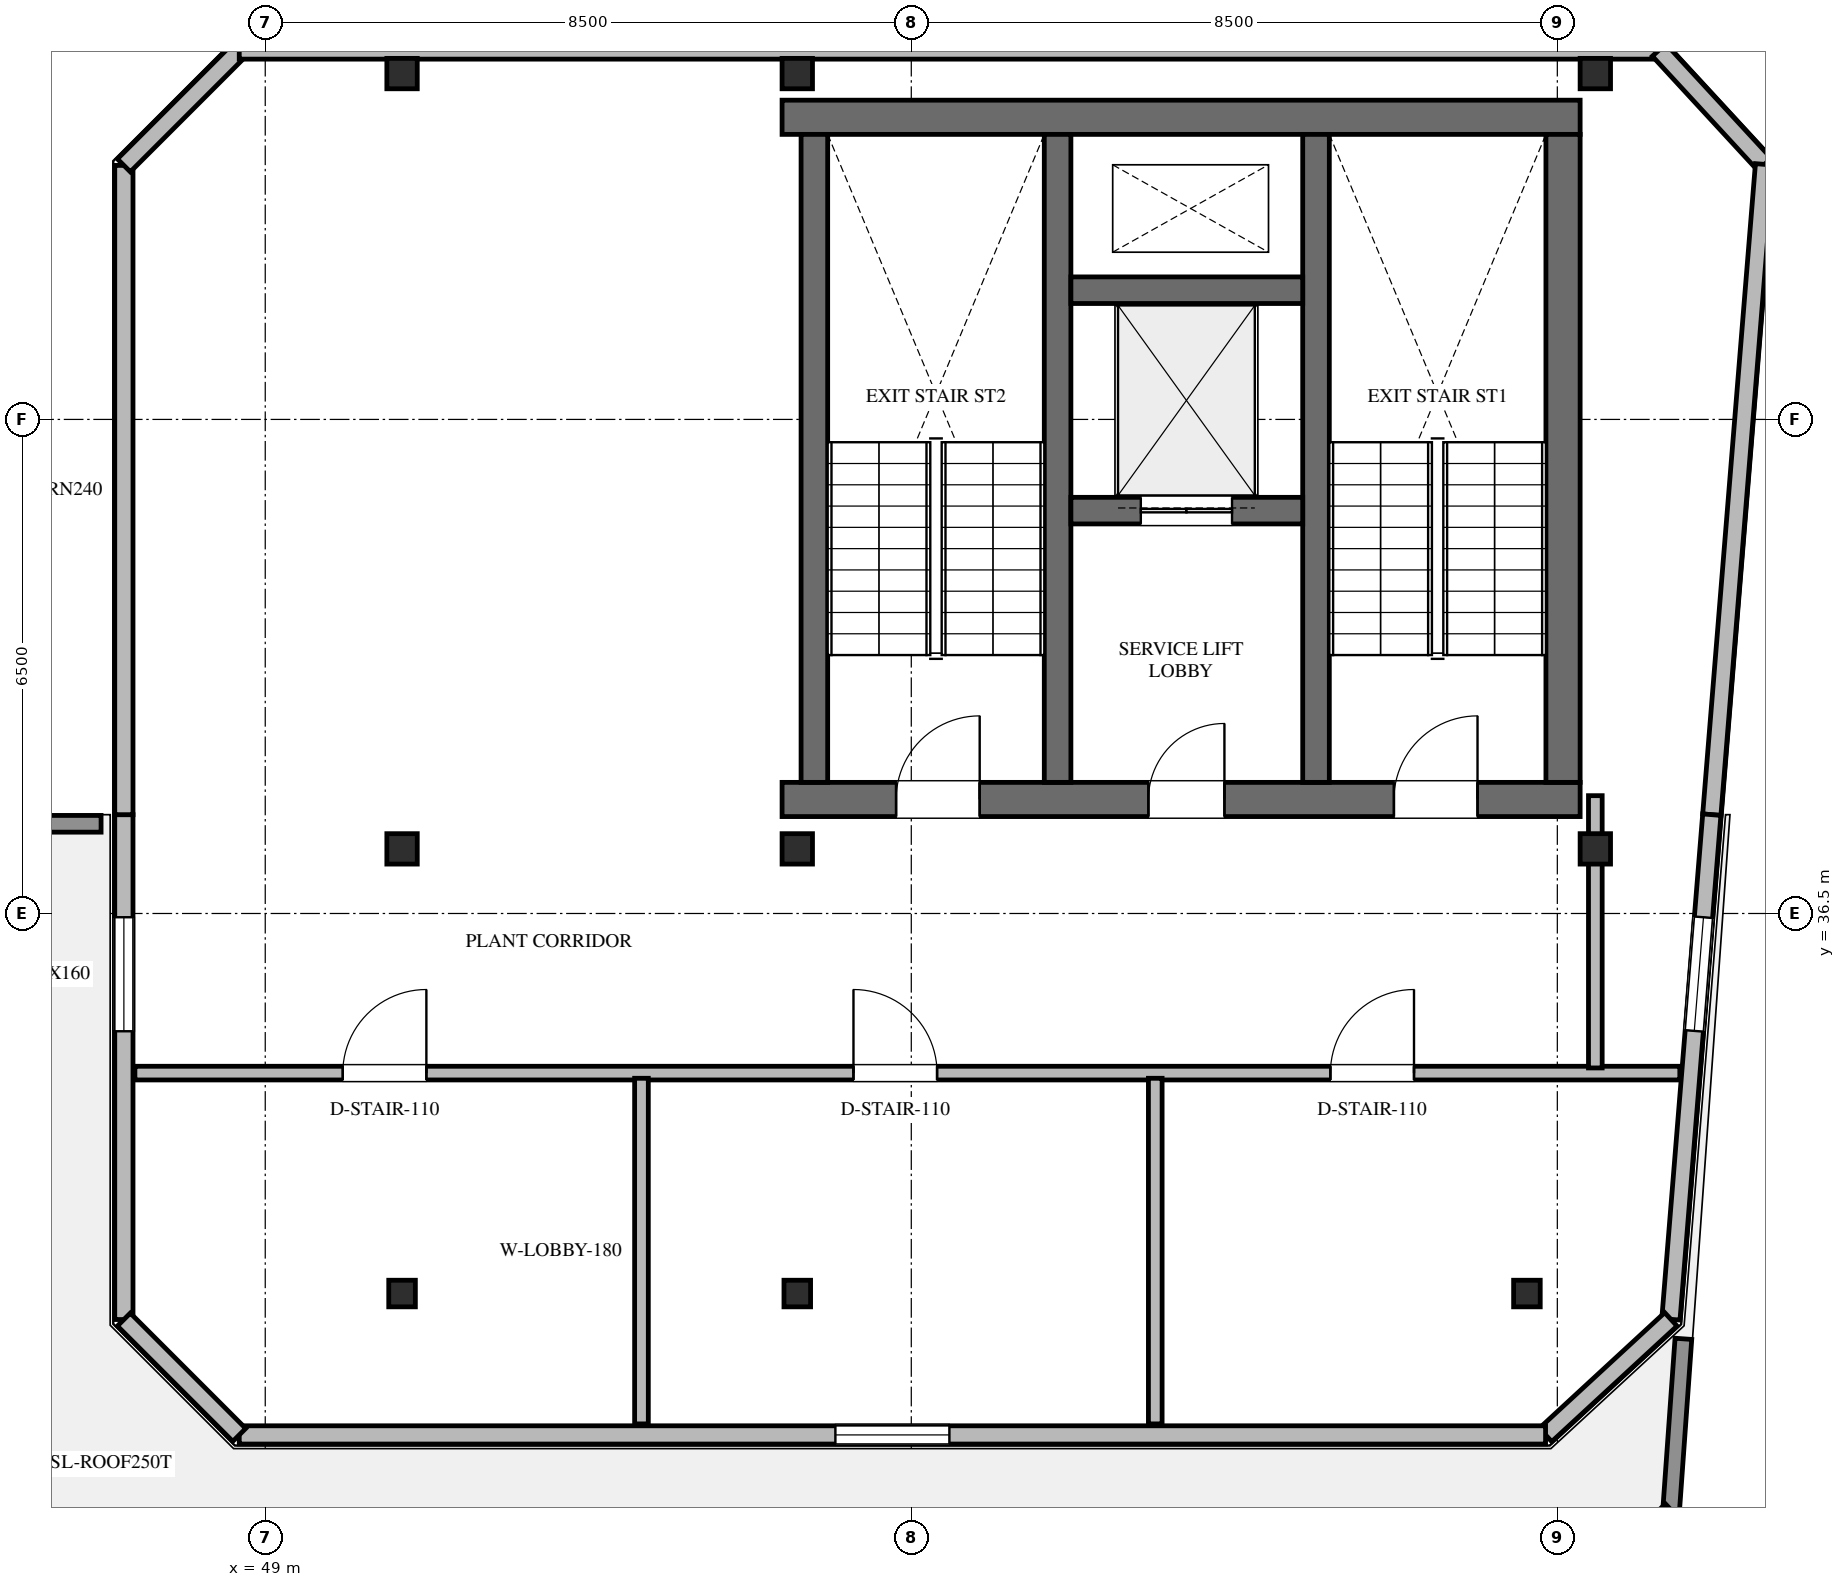
"""IFC4 building model, lengths in metres.
Left out: names, types, materials, properties, quantities, classifications, styles, units other than length and angle.
Written with IfcOpenShell. Run it as: python <this file> out.ifc"""

import sys

from ifc_helpers import new_model, si_unit, direction, frame, frame_2d, origin, origin_2d, place, context, subcontext, project, spatial, rectangle, hollow_rectangle, extrude, element, fill, save


model = new_model("IFC4")
c1 = context("Model", 3, precision=1e-05, world=origin(), true_north=direction((0.0, 1.0)))
c2 = subcontext(c1, "Body", "Model", "MODEL_VIEW")
j1 = project(units=[si_unit("LENGTHUNIT", "METRE"), si_unit("PLANEANGLEUNIT", "RADIAN")], contexts=[c1])
p1 = place(None, origin())
s1 = spatial("IfcSite", under=j1, at=p1, CompositionType="ELEMENT")
p2 = place(p1, origin())
s2 = spatial("IfcBuilding", under=s1, at=p2, CompositionType="ELEMENT")
p3 = place(p2, frame((0.0, 0.0, 322.8)))
s3 = spatial("IfcBuildingStorey", under=s2, at=p3, CompositionType="ELEMENT", Elevation=322.8)
p4 = place(p3, frame((55.8, 46.975, 0.0), z_axis=(0.0, 0.0, 1.0), x_axis=(1.0, 0.0, 0.0)))
e1 = element("IfcWall", 1, at=p4, inside=s3, PredefinedType="SHEAR", context=c2, shape_type="SweptSolid", body=[
    extrude(rectangle(XDim=10.5, YDim=0.45, at=frame_2d((5.25, 0.0))), origin(), (0.0, 0.0, 1.0), 3.6),
])
p5 = place(p3, frame((55.8, 38.0, 0.0), z_axis=(0.0, 0.0, 1.0), x_axis=(1.0, 0.0, 0.0)))
e2 = element("IfcWall", 2, at=p5, inside=s3, PredefinedType="SHEAR", context=c2, shape_type="SweptSolid", body=[
    extrude(rectangle(XDim=10.5, YDim=0.45, at=frame_2d((5.25, 0.0))), origin(), (0.0, 0.0, 1.0), 3.6),
])
p6 = place(p5, frame((1.5, 0.0, 0.0)))
e3 = element("IfcOpeningElement", 3, at=p6, cuts=e2, PredefinedType="OPENING", context=c2, shape_type="SweptSolid", body=[
    extrude(rectangle(XDim=1.1, YDim=2.2, at=frame_2d((0.55, 1.1))), frame((0.0, 0.235, 0.0), z_axis=(0.0, -1.0, 0.0), x_axis=(1.0, 0.0, 0.0)), (0.0, 0.0, 1.0), 0.47),
])
p7 = place(p5, frame((4.82, 0.0, 0.0)))
e4 = element("IfcOpeningElement", 4, at=p7, cuts=e2, PredefinedType="OPENING", context=c2, shape_type="SweptSolid", body=[
    extrude(rectangle(XDim=1.0, YDim=2.15, at=frame_2d((0.5, 1.075))), frame((0.0, 0.235, 0.0), z_axis=(0.0, -1.0, 0.0), x_axis=(1.0, 0.0, 0.0)), (0.0, 0.0, 1.0), 0.47),
])
p8 = place(p5, frame((8.05, 0.0, 0.0)))
e5 = element("IfcOpeningElement", 5, at=p8, cuts=e2, PredefinedType="OPENING", context=c2, shape_type="SweptSolid", body=[
    extrude(rectangle(XDim=1.1, YDim=2.2, at=frame_2d((0.55, 1.1))), frame((0.0, 0.235, 0.0), z_axis=(0.0, -1.0, 0.0), x_axis=(1.0, 0.0, 0.0)), (0.0, 0.0, 1.0), 0.47),
])
p9 = place(p3, frame((66.075, 38.225, 0.0), z_axis=(0.0, 0.0, 1.0), x_axis=(0.0, 1.0, 0.0)))
e6 = element("IfcWall", 6, at=p9, inside=s3, PredefinedType="SHEAR", context=c2, shape_type="SweptSolid", body=[
    extrude(rectangle(XDim=8.525, YDim=0.45, at=frame_2d((4.262, 0.0))), origin(), (0.0, 0.0, 1.0), 3.6),
])
for number, where, z_axis, x_axis in (
    (7, (62.825, 38.225, 0.0), (0.0, 0.0, 1.0), (0.0, 1.0, 0.0)),
    (8, (59.425, 38.225, 0.0), (0.0, 0.0, 1.0), (0.0, 1.0, 0.0)),
    (9, (56.225, 38.225, 0.0), (0.0, 0.0, 1.0), (0.0, 1.0, 0.0)),
):
    element("IfcWall", number, at=place(p3, frame(where, z_axis=z_axis, x_axis=x_axis)), inside=s3, PredefinedType="SHEAR", context=c2, shape_type="SweptSolid", body=[
        extrude(rectangle(XDim=8.525, YDim=0.35, at=frame_2d((4.262, 0.0))), origin(), (0.0, 0.0, 1.0), 3.6),
    ])
p10 = place(p3, frame((59.6, 41.8, 0.0), z_axis=(0.0, 0.0, 1.0), x_axis=(1.0, 0.0, 0.0)))
e10 = element("IfcWall", 10, at=p10, inside=s3, PredefinedType="SHEAR", context=c2, shape_type="SweptSolid", body=[
    extrude(rectangle(XDim=3.05, YDim=0.35, at=frame_2d((1.525, 0.0))), origin(), (0.0, 0.0, 1.0), 3.6),
])
p11 = place(p10, frame((0.92, 0.0, 0.0)))
e11 = element("IfcOpeningElement", 11, at=p11, cuts=e10, PredefinedType="OPENING", context=c2, shape_type="SweptSolid", body=[
    extrude(rectangle(XDim=1.2, YDim=2.2, at=frame_2d((0.6, 1.1))), frame((0.0, 0.185, 0.0), z_axis=(0.0, -1.0, 0.0), x_axis=(1.0, 0.0, 0.0)), (0.0, 0.0, 1.0), 0.37),
])
p12 = place(p3, frame((59.6, 44.7, 0.0), z_axis=(0.0, 0.0, 1.0), x_axis=(1.0, 0.0, 0.0)))
e12 = element("IfcWall", 12, at=p12, inside=s3, PredefinedType="SHEAR", context=c2, shape_type="SweptSolid", body=[
    extrude(rectangle(XDim=3.05, YDim=0.35, at=frame_2d((1.525, 0.0))), origin(), (0.0, 0.0, 1.0), 3.6),
])
for number, where, z_axis, x_axis in (
    (13, (56.0, 31.5, 0.0), (0.0, 0.0, 1.0), (1.0, 0.0, 0.0)),
    (14, (65.6, 31.5, 0.0), (0.0, 0.0, 1.0), (1.0, 0.0, 0.0)),
    (15, (50.8, 31.5, 0.0), (0.0, 0.0, 1.0), (1.0, 0.0, 0.0)),
):
    element("IfcColumn", number, at=place(p3, frame(where, z_axis=z_axis, x_axis=x_axis)), inside=s3, PredefinedType="COLUMN", context=c2, shape_type="SweptSolid", body=[
        extrude(hollow_rectangle(XDim=0.35, YDim=0.35, WallThickness=0.016, at=origin_2d()), origin(), (0.0, 0.0, 1.0), 3.6),
    ])
for number, where, z_axis, x_axis in (
    (16, (66.5, 47.55, 0.0), (0.0, 0.0, 1.0), (1.0, 0.0, 0.0)),
    (17, (56.0, 47.55, 0.0), (0.0, 0.0, 1.0), (1.0, 0.0, 0.0)),
    (18, (66.5, 37.35, 0.0), (0.0, 0.0, 1.0), (1.0, 0.0, 0.0)),
    (19, (56.0, 37.35, 0.0), (0.0, 0.0, 1.0), (1.0, 0.0, 0.0)),
    (20, (50.8, 47.55, 0.0), (0.0, 0.0, 1.0), (1.0, 0.0, 0.0)),
    (21, (50.8, 37.35, 0.0), (0.0, 0.0, 1.0), (1.0, 0.0, 0.0)),
):
    element("IfcColumn", number, at=place(p3, frame(where, z_axis=z_axis, x_axis=x_axis)), inside=s3, PredefinedType="COLUMN", context=c2, shape_type="SweptSolid", body=[
        extrude(hollow_rectangle(XDim=0.4, YDim=0.4, WallThickness=0.016, at=origin_2d()), origin(), (0.0, 0.0, 1.0), 3.6),
    ])
p13 = place(p3, frame((46.15, 27.12, 0.0), z_axis=(0.0, 0.0, 1.0), x_axis=(-0.707106781187, 0.707106781187, 0.0)))
e22 = element("IfcWall", 22, at=p13, inside=s3, PredefinedType="PARAPET", context=c2, shape_type="SweptSolid", body=[
    extrude(rectangle(XDim=2.163, YDim=0.22, at=frame_2d((1.082, 0.0))), origin(), (0.0, 0.0, 1.0), 1.2),
])
p14 = place(p3, frame((44.62, 37.68, 0.0), z_axis=(0.0, 0.0, 1.0), x_axis=(1.0, 0.0, 0.0)))
e23 = element("IfcWall", 23, at=p14, inside=s3, PredefinedType="PARAPET", context=c2, shape_type="SweptSolid", body=[
    extrude(rectangle(XDim=2.22, YDim=0.22, at=frame_2d((1.11, 0.0))), origin(), (0.0, 0.0, 1.0), 1.2),
])
p15 = place(p3, frame((67.659, 30.904, 0.0), z_axis=(0.0, 0.0, 1.0), x_axis=(-0.071247049988, -0.997458699831, 0.0)))
e24 = element("IfcWall", 24, at=p15, inside=s3, PredefinedType="PARAPET", context=c2, shape_type="SweptSolid", body=[
    extrude(rectangle(XDim=2.258, YDim=0.22, at=frame_2d((1.129, 0.0))), origin(), (0.0, 0.0, 1.0), 1.2),
])
p16 = place(p3, frame((67.498, 28.652, 0.0), z_axis=(0.0, 0.0, 1.0), x_axis=(-0.731910786765, -0.68140046978, 0.0)))
e25 = element("IfcWall", 25, at=p16, inside=s3, PredefinedType="PARAPET", context=c2, shape_type="SweptSolid", body=[
    extrude(rectangle(XDim=2.248, YDim=0.22, at=frame_2d((1.124, 0.0))), origin(), (0.0, 0.0, 1.0), 1.2),
])
p17 = place(p3, frame((47.14, 31.158, 0.0), z_axis=(0.0, 0.0, 1.0), x_axis=(0.0, 1.0, 0.0)))
e26 = element("IfcWall", 26, at=p17, inside=s3, PredefinedType="STANDARD", context=c2, shape_type="SweptSolid", body=[
    extrude(rectangle(XDim=6.642, YDim=0.24, at=frame_2d((3.321, 0.0))), origin(), (0.0, 0.0, 1.0), 3.32),
])
p18 = place(p17, frame((3.792, 0.0, 0.9)))
e27 = element("IfcOpeningElement", 27, at=p18, cuts=e26, PredefinedType="OPENING", context=c2, shape_type="SweptSolid", body=[
    extrude(rectangle(XDim=1.5, YDim=1.6, at=frame_2d((0.75, 0.8))), frame((0.0, 0.13, 0.0), z_axis=(0.0, -1.0, 0.0), x_axis=(1.0, 0.0, 0.0)), (0.0, 0.0, 1.0), 0.26),
])
p19 = place(p3, frame((47.14, 37.8, 0.0), z_axis=(0.0, 0.0, 1.0), x_axis=(0.0, 1.0, 0.0)))
e28 = element("IfcWall", 28, at=p19, inside=s3, PredefinedType="STANDARD", context=c2, shape_type="SweptSolid", body=[
    extrude(rectangle(XDim=8.542, YDim=0.24, at=frame_2d((4.271, 0.0))), origin(), (0.0, 0.0, 1.0), 3.32),
])
p20 = place(p3, frame((47.14, 46.342, 0.0), z_axis=(0.0, 0.0, 1.0), x_axis=(0.707106781187, 0.707106781187, 0.0)))
e29 = element("IfcWall", 29, at=p20, inside=s3, PredefinedType="STANDARD", context=c2, shape_type="SweptSolid", body=[
    extrude(rectangle(XDim=2.147, YDim=0.24, at=frame_2d((1.073, 0.0))), origin(), (0.0, 0.0, 1.0), 3.32),
])
p21 = place(p3, frame((48.658, 47.86, 0.0), z_axis=(0.0, 0.0, 1.0), x_axis=(1.0, 0.0, 0.0)))
e30 = element("IfcWall", 30, at=p21, inside=s3, PredefinedType="STANDARD", context=c2, shape_type="SweptSolid", body=[
    extrude(rectangle(XDim=18.681, YDim=0.24, at=frame_2d((9.34, 0.0))), origin(), (0.0, 0.0, 1.0), 2.709),
])
p22 = place(p3, frame((67.339, 47.86, 0.0), z_axis=(0.0, 0.0, 1.0), x_axis=(0.677962987297, -0.735096039886, 0.0)))
e31 = element("IfcWall", 31, at=p22, inside=s3, PredefinedType="STANDARD", context=c2, shape_type="SweptSolid", body=[
    extrude(rectangle(XDim=2.047, YDim=0.24, at=frame_2d((1.023, 0.0))), origin(), (0.0, 0.0, 1.0), 3.32),
])
p23 = place(p3, frame((68.726, 46.355, 0.0), z_axis=(0.0, 0.0, 1.0), x_axis=(-0.080834961466, -0.996727499874, 0.0)))
e32 = element("IfcWall", 32, at=p23, inside=s3, PredefinedType="STANDARD", context=c2, shape_type="SweptSolid", body=[
    extrude(rectangle(XDim=8.583, YDim=0.24, at=frame_2d((4.292, 0.0))), origin(), (0.0, 0.0, 1.0), 3.32),
])
p24 = place(p3, frame((68.032, 37.8, 0.0), z_axis=(0.0, 0.0, 1.0), x_axis=(-0.080815868766, -0.996729048115, 0.0)))
e33 = element("IfcWall", 33, at=p24, inside=s3, PredefinedType="STANDARD", context=c2, shape_type="SweptSolid", body=[
    extrude(rectangle(XDim=6.661, YDim=0.24, at=frame_2d((3.331, 0.0))), origin(), (0.0, 0.0, 1.0), 3.32),
])
p25 = place(p24, frame((1.354, 0.0, 0.9)))
e34 = element("IfcOpeningElement", 34, at=p25, cuts=e33, PredefinedType="OPENING", context=c2, shape_type="SweptSolid", body=[
    extrude(rectangle(XDim=1.5, YDim=1.6, at=frame_2d((0.75, 0.8))), frame((0.0, 0.13, 0.0), z_axis=(0.0, -1.0, 0.0), x_axis=(1.0, 0.0, 0.0)), (0.0, 0.0, 1.0), 0.26),
])
p26 = place(p3, frame((67.494, 31.161, 0.0), z_axis=(0.0, 0.0, 1.0), x_axis=(-0.735099639576, -0.677959084234, 0.0)))
e35 = element("IfcWall", 35, at=p26, inside=s3, PredefinedType="STANDARD", context=c2, shape_type="SweptSolid", body=[
    extrude(rectangle(XDim=2.243, YDim=0.24, at=frame_2d((1.122, 0.0))), origin(), (0.0, 0.0, 1.0), 3.32),
])
p27 = place(p3, frame((65.845, 29.64, 0.0), z_axis=(0.0, 0.0, 1.0), x_axis=(-1.0, 0.0, 0.0)))
e36 = element("IfcWall", 36, at=p27, inside=s3, PredefinedType="STANDARD", context=c2, shape_type="SweptSolid", body=[
    extrude(rectangle(XDim=17.187, YDim=0.24, at=frame_2d((8.594, 0.0))), origin(), (0.0, 0.0, 1.0), 3.32),
])
p28 = place(p27, frame((7.844, 0.0, 0.9)))
e37 = element("IfcOpeningElement", 37, at=p28, cuts=e36, PredefinedType="OPENING", context=c2, shape_type="SweptSolid", body=[
    extrude(rectangle(XDim=1.5, YDim=1.6, at=frame_2d((0.75, 0.8))), frame((0.0, 0.13, 0.0), z_axis=(0.0, -1.0, 0.0), x_axis=(1.0, 0.0, 0.0)), (0.0, 0.0, 1.0), 0.26),
])
p29 = place(p3, frame((48.658, 29.64, 0.0), z_axis=(0.0, 0.0, 1.0), x_axis=(-0.707106781187, 0.707106781187, 0.0)))
e38 = element("IfcWall", 38, at=p29, inside=s3, PredefinedType="STANDARD", context=c2, shape_type="SweptSolid", body=[
    extrude(rectangle(XDim=2.147, YDim=0.24, at=frame_2d((1.073, 0.0))), origin(), (0.0, 0.0, 1.0), 3.32),
])
p30 = place(p3, frame((47.285, 34.4, 0.0), z_axis=(0.0, 0.0, 1.0), x_axis=(1.0, 0.0, 0.0)))
e39 = element("IfcWall", 39, at=p30, inside=s3, PredefinedType="STANDARD", context=c2, shape_type="SweptSolid", body=[
    extrude(rectangle(XDim=20.326, YDim=0.18, at=frame_2d((10.163, 0.0))), origin(), (0.0, 0.0, 1.0), 2.709),
])
p31 = place(p30, frame((2.735, 0.0, 0.0)))
e40 = element("IfcOpeningElement", 40, at=p31, cuts=e39, PredefinedType="OPENING", context=c2, shape_type="SweptSolid", body=[
    extrude(rectangle(XDim=1.1, YDim=2.2, at=frame_2d((0.55, 1.1))), frame((0.0, 0.1, 0.0), z_axis=(0.0, -1.0, 0.0), x_axis=(1.0, 0.0, 0.0)), (0.0, 0.0, 1.0), 0.2),
])
p32 = place(p30, frame((9.454, 0.0, 0.0)))
e41 = element("IfcOpeningElement", 41, at=p32, cuts=e39, PredefinedType="OPENING", context=c2, shape_type="SweptSolid", body=[
    extrude(rectangle(XDim=1.1, YDim=2.2, at=frame_2d((0.55, 1.1))), frame((0.0, 0.1, 0.0), z_axis=(0.0, -1.0, 0.0), x_axis=(1.0, 0.0, 0.0)), (0.0, 0.0, 1.0), 0.2),
])
p33 = place(p30, frame((15.729, 0.0, 0.0)))
e42 = element("IfcOpeningElement", 42, at=p33, cuts=e39, PredefinedType="OPENING", context=c2, shape_type="SweptSolid", body=[
    extrude(rectangle(XDim=1.1, YDim=2.2, at=frame_2d((0.55, 1.1))), frame((0.0, 0.1, 0.0), z_axis=(0.0, -1.0, 0.0), x_axis=(1.0, 0.0, 0.0)), (0.0, 0.0, 1.0), 0.2),
])
p34 = place(p3, frame((66.5, 34.468, 0.0), z_axis=(0.0, 0.0, 1.0), x_axis=(0.0, 1.0, 0.0)))
e43 = element("IfcWall", 43, at=p34, inside=s3, PredefinedType="STANDARD", context=c2, shape_type="SweptSolid", body=[
    extrude(rectangle(XDim=3.582, YDim=0.18, at=frame_2d((1.791, 0.0))), origin(), (0.0, 0.0, 1.0), 2.709),
])
for number, where, z_axis, x_axis in (
    (44, (53.95, 29.785, 0.0), (0.0, 0.0, 1.0), (0.0, 1.0, 0.0)),
    (45, (60.71, 29.785, 0.0), (0.0, 0.0, 1.0), (0.0, 1.0, 0.0)),
):
    element("IfcWall", number, at=place(p3, frame(where, z_axis=z_axis, x_axis=x_axis)), inside=s3, PredefinedType="STANDARD", context=c2, shape_type="SweptSolid", body=[
        extrude(rectangle(XDim=4.547, YDim=0.18, at=frame_2d((2.273, 0.0))), origin(), (0.0, 0.0, 1.0), 2.709),
    ])
p35 = place(p18, origin())
e46 = element("IfcWindow", 46, at=p35, inside=s3, PartitioningType="SINGLE_PANEL", PredefinedType="WINDOW", context=c2, shape_type="SweptSolid", body=[
    extrude(rectangle(XDim=1.5, YDim=1.6, at=frame_2d((0.75, 0.8))), frame((0.0, 0.03, 0.0), z_axis=(0.0, -1.0, 0.0), x_axis=(1.0, 0.0, 0.0)), (0.0, 0.0, 1.0), 0.06),
])
fill(e27, e46)
p36 = place(p25, origin())
e47 = element("IfcWindow", 47, at=p36, inside=s3, PartitioningType="SINGLE_PANEL", PredefinedType="WINDOW", context=c2, shape_type="SweptSolid", body=[
    extrude(rectangle(XDim=1.5, YDim=1.6, at=frame_2d((0.75, 0.8))), frame((0.0, 0.03, 0.0), z_axis=(0.0, -1.0, 0.0), x_axis=(1.0, 0.0, 0.0)), (0.0, 0.0, 1.0), 0.06),
])
fill(e34, e47)
p37 = place(p28, origin())
e48 = element("IfcWindow", 48, at=p37, inside=s3, PartitioningType="SINGLE_PANEL", PredefinedType="WINDOW", context=c2, shape_type="SweptSolid", body=[
    extrude(rectangle(XDim=1.5, YDim=1.6, at=frame_2d((0.75, 0.8))), frame((0.0, 0.03, 0.0), z_axis=(0.0, -1.0, 0.0), x_axis=(1.0, 0.0, 0.0)), (0.0, 0.0, 1.0), 0.06),
])
fill(e37, e48)
p38 = place(p6, origin())
e49 = element("IfcDoor", 49, at=p38, inside=s3, OperationType="SINGLE_SWING_RIGHT", PredefinedType="DOOR", context=c2, shape_type="SweptSolid", body=[
    extrude(rectangle(XDim=1.1, YDim=2.2, at=frame_2d((0.55, 1.1))), frame((0.0, 0.025, 0.0), z_axis=(0.0, -1.0, 0.0), x_axis=(1.0, 0.0, 0.0)), (0.0, 0.0, 1.0), 0.05),
])
fill(e3, e49)
p39 = place(p7, origin())
e50 = element("IfcDoor", 50, at=p39, inside=s3, OperationType="SINGLE_SWING_RIGHT", PredefinedType="DOOR", context=c2, shape_type="SweptSolid", body=[
    extrude(rectangle(XDim=1.0, YDim=2.15, at=frame_2d((0.5, 1.075))), frame((0.0, 0.025, 0.0), z_axis=(0.0, -1.0, 0.0), x_axis=(1.0, 0.0, 0.0)), (0.0, 0.0, 1.0), 0.05),
])
fill(e4, e50)
p40 = place(p8, origin())
e51 = element("IfcDoor", 51, at=p40, inside=s3, OperationType="SINGLE_SWING_RIGHT", PredefinedType="DOOR", context=c2, shape_type="SweptSolid", body=[
    extrude(rectangle(XDim=1.1, YDim=2.2, at=frame_2d((0.55, 1.1))), frame((0.0, 0.025, 0.0), z_axis=(0.0, -1.0, 0.0), x_axis=(1.0, 0.0, 0.0)), (0.0, 0.0, 1.0), 0.05),
])
fill(e5, e51)
p41 = place(p11, origin())
e52 = element("IfcDoor", 52, at=p41, inside=s3, OperationType="DOUBLE_DOOR_SLIDING", PredefinedType="DOOR", context=c2, shape_type="SweptSolid", body=[
    extrude(rectangle(XDim=1.2, YDim=2.2, at=frame_2d((0.6, 1.1))), frame((0.0, 0.025, 0.0), z_axis=(0.0, -1.0, 0.0), x_axis=(1.0, 0.0, 0.0)), (0.0, 0.0, 1.0), 0.05),
])
fill(e11, e52)
p42 = place(p31, origin())
e53 = element("IfcDoor", 53, at=p42, inside=s3, OperationType="SINGLE_SWING_RIGHT", PredefinedType="DOOR", context=c2, shape_type="SweptSolid", body=[
    extrude(rectangle(XDim=1.1, YDim=2.2, at=frame_2d((0.55, 1.1))), frame((0.0, 0.025, 0.0), z_axis=(0.0, -1.0, 0.0), x_axis=(1.0, 0.0, 0.0)), (0.0, 0.0, 1.0), 0.05),
])
fill(e40, e53)
p43 = place(p32, origin())
e54 = element("IfcDoor", 54, at=p43, inside=s3, OperationType="SINGLE_SWING_LEFT", PredefinedType="DOOR", context=c2, shape_type="SweptSolid", body=[
    extrude(rectangle(XDim=1.1, YDim=2.2, at=frame_2d((0.55, 1.1))), frame((0.0, 0.025, 0.0), z_axis=(0.0, -1.0, 0.0), x_axis=(1.0, 0.0, 0.0)), (0.0, 0.0, 1.0), 0.05),
])
fill(e41, e54)
p44 = place(p33, origin())
e55 = element("IfcDoor", 55, at=p44, inside=s3, OperationType="SINGLE_SWING_RIGHT", PredefinedType="DOOR", context=c2, shape_type="SweptSolid", body=[
    extrude(rectangle(XDim=1.1, YDim=2.2, at=frame_2d((0.55, 1.1))), frame((0.0, 0.025, 0.0), z_axis=(0.0, -1.0, 0.0), x_axis=(1.0, 0.0, 0.0)), (0.0, 0.0, 1.0), 0.05),
])
fill(e42, e55)
save(model, sys.argv[1])
